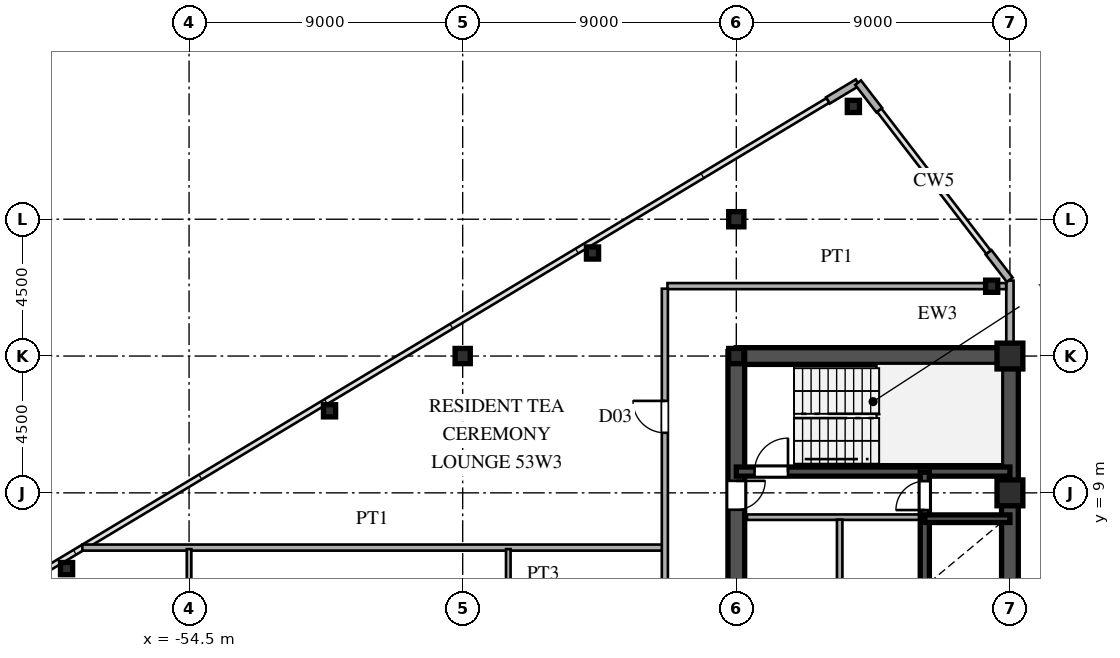
"""IFC4 building model, lengths in metres.
Left out: names, types, materials, properties, quantities, classifications, styles, units other than length and angle.
Written with IfcOpenShell. Run it as: python <this file> out.ifc"""

import sys

from ifc_helpers import new_model, si_unit, direction, frame, frame_2d, origin, origin_2d, place, context, subcontext, project, spatial, rectangle, hollow_rectangle, i_section, extrude, source, transform, mapped, element, fill, save


model = new_model("IFC4")
c1 = context("Model", 3, precision=1e-05, world=origin(), true_north=direction((0.0, 1.0)))
c2 = subcontext(c1, "Body", "Model", "MODEL_VIEW")
j1 = project(units=[si_unit("LENGTHUNIT", "METRE"), si_unit("PLANEANGLEUNIT", "RADIAN")], contexts=[c1])
p1 = place(None, origin())
s1 = spatial("IfcSite", under=j1, at=p1, CompositionType="ELEMENT")
p2 = place(p1, origin())
s2 = spatial("IfcBuilding", under=s1, at=p2, CompositionType="ELEMENT")
p3 = place(p2, frame((0.0, 0.0, 199.5)))
s3 = spatial("IfcBuildingStorey", under=s2, at=p3, CompositionType="ELEMENT", Elevation=199.5)
m1 = source(origin(), c2, "Body", "SweptSolid", [
    extrude(hollow_rectangle(XDim=0.85, YDim=0.85, WallThickness=0.036, at=origin_2d()), origin(), (0.0, 0.0, 1.0), 3.6),
])
for number, where, z_axis, x_axis in (
    (1, (-27.5, 9.0, 0.0), (0.0, 0.0, 1.0), (1.0, 0.0, 0.0)),
    (2, (-27.5, 13.5, 0.0), (0.0, 0.0, 1.0), (1.0, 0.0, 0.0)),
):
    element("IfcColumn", number, at=place(p3, frame(where, z_axis=z_axis, x_axis=x_axis)), inside=s3, PredefinedType="COLUMN", context=c2, shape_type="MappedRepresentation", body=[
        mapped(m1, transform((0.0, 0.0, 0.0), scale=1.0)),
    ])
m2 = source(origin(), c2, "Body", "SweptSolid", [
    extrude(i_section(OverallWidth=0.5, OverallDepth=0.5, WebThickness=0.02, FlangeThickness=0.032, at=origin_2d()), origin(), (0.0, 0.0, 1.0), 3.6),
])
for number, where, z_axis, x_axis in (
    (3, (-36.5, 13.5, 0.0), (0.0, 0.0, 1.0), (1.0, 0.0, 0.0)),
    (4, (-36.5, 18.0, 0.0), (0.0, 0.0, 1.0), (1.0, 0.0, 0.0)),
    (5, (-45.5, 13.5, 0.0), (0.0, 0.0, 1.0), (1.0, 0.0, 0.0)),
):
    element("IfcColumn", number, at=place(p3, frame(where, z_axis=z_axis, x_axis=x_axis)), inside=s3, PredefinedType="COLUMN", context=c2, shape_type="MappedRepresentation", body=[
        mapped(m2, transform((0.0, 0.0, 0.0), scale=1.0)),
    ])
m3 = source(origin(), c2, "Body", "SweptSolid", [
    extrude(hollow_rectangle(XDim=0.4, YDim=0.4, WallThickness=0.016, at=origin_2d()), origin(), (0.0, 0.0, 1.0), 3.6),
])
for number, where, z_axis, x_axis in (
    (6, (-28.1, 15.796, 0.0), (0.0, 0.0, 1.0), (1.0, 0.0, 0.0)),
    (7, (-32.65, 21.71, 0.0), (0.0, 0.0, 1.0), (1.0, 0.0, 0.0)),
    (8, (-41.23, 16.889, 0.0), (0.0, 0.0, 1.0), (1.0, 0.0, 0.0)),
    (9, (-49.88, 11.699, 0.0), (0.0, 0.0, 1.0), (1.0, 0.0, 0.0)),
    (10, (-58.53, 6.509, 0.0), (0.0, 0.0, 1.0), (1.0, 0.0, 0.0)),
):
    element("IfcColumn", number, at=place(p3, frame(where, z_axis=z_axis, x_axis=x_axis)), inside=s3, PredefinedType="COLUMN", context=c2, shape_type="MappedRepresentation", body=[
        mapped(m3, transform((0.0, 0.0, 0.0), scale=1.0)),
    ])
p4 = place(p3, frame((-27.5, 13.78, 0.0), z_axis=(0.0, 0.0, 1.0), x_axis=(0.0, 1.0, 0.0)))
e11 = element("IfcWall", 11, at=p4, inside=s3, PredefinedType="SOLIDWALL", context=c2, shape_type="SweptSolid", body=[
    extrude(rectangle(XDim=0.6, YDim=0.24, at=frame_2d((0.3, 0.0))), origin(), (0.0, 0.0, 1.0), 2.88),
])
p5 = place(p3, frame((-27.5, 14.38, 0.0), z_axis=(0.0, 0.0, 1.0), x_axis=(0.0, 1.0, 0.0)))
e12 = element("IfcWall", 12, at=p5, inside=s3, PredefinedType="SOLIDWALL", context=c2, shape_type="SweptSolid", body=[
    extrude(rectangle(XDim=1.6, YDim=0.24, at=frame_2d((0.8, 0.0))), origin(), (0.0, 0.0, 1.0), 3.38),
])
for number, where, z_axis, x_axis in (
    (13, (-27.506, 16.008, 0.0), (0.0, 0.0, 1.0), (-0.61, 0.793, 0.0)),
    (14, (-31.799, 21.588, 0.0), (0.0, 0.0, 1.0), (-0.61, 0.793, 0.0)),
    (15, (-32.509, 22.495, 0.0), (0.0, 0.0, 1.0), (-0.857, -0.515, 0.0)),
):
    element("IfcWall", number, at=place(p3, frame(where, z_axis=z_axis, x_axis=x_axis)), inside=s3, PredefinedType="SOLIDWALL", context=c2, shape_type="SweptSolid", body=[
        extrude(rectangle(XDim=1.14, YDim=0.24, at=frame_2d((0.57, 0.0))), origin(), (0.0, 0.0, 1.0), 3.38),
    ])
p6 = place(p3, frame((-27.5, 1.3, 0.0), z_axis=(0.0, 0.0, 1.0), x_axis=(0.0, 1.0, 0.0)))
e16 = element("IfcWall", 16, at=p6, inside=s3, PredefinedType="SHEAR", context=c2, shape_type="SweptSolid", body=[
    extrude(rectangle(XDim=12.2, YDim=0.55, at=frame_2d((6.1, 0.0))), origin(), (0.0, 0.0, 1.0), 3.38),
])
p7 = place(p3, frame((-36.5, 13.5, 0.0), z_axis=(0.0, 0.0, 1.0), x_axis=(1.0, 0.0, 0.0)))
e17 = element("IfcWall", 17, at=p7, inside=s3, PredefinedType="SHEAR", context=c2, shape_type="SweptSolid", body=[
    extrude(rectangle(XDim=9.0, YDim=0.55, at=frame_2d((4.5, 0.0))), origin(), (0.0, 0.0, 1.0), 3.38),
])
p8 = place(p3, frame((-36.5, 8.2, 0.0), z_axis=(0.0, 0.0, 1.0), x_axis=(0.0, 1.0, 0.0)))
e18 = element("IfcWall", 18, at=p8, inside=s3, PredefinedType="SHEAR", context=c2, shape_type="SweptSolid", body=[
    extrude(rectangle(XDim=5.45, YDim=0.55, at=frame_2d((2.725, 0.0))), origin(), (0.0, 0.0, 1.0), 3.38),
])
p9 = place(p8, frame((0.245, 0.0, 0.0)))
e19 = element("IfcOpeningElement", 19, at=p9, cuts=e18, PredefinedType="OPENING", context=c2, shape_type="SweptSolid", body=[
    extrude(rectangle(XDim=0.95, YDim=2.15, at=frame_2d((0.475, 1.075))), frame((0.0, 0.285, 0.0), z_axis=(0.0, -1.0, 0.0), x_axis=(1.0, 0.0, 0.0)), (0.0, 0.0, 1.0), 0.57),
])
p10 = place(p3, frame((-36.5, 1.3, 0.0), z_axis=(0.0, 0.0, 1.0), x_axis=(0.0, 1.0, 0.0)))
e20 = element("IfcWall", 20, at=p10, inside=s3, PredefinedType="SHEAR", context=c2, shape_type="SweptSolid", body=[
    extrude(rectangle(XDim=6.9, YDim=0.55, at=frame_2d((3.45, 0.0))), origin(), (0.0, 0.0, 1.0), 3.38),
])
p11 = place(p10, frame((2.975, 0.0, 0.0)))
e21 = element("IfcOpeningElement", 21, at=p11, cuts=e20, PredefinedType="OPENING", context=c2, shape_type="SweptSolid", body=[
    extrude(rectangle(XDim=0.95, YDim=2.15, at=frame_2d((0.475, 1.075))), frame((0.0, 0.285, 0.0), z_axis=(0.0, -1.0, 0.0), x_axis=(1.0, 0.0, 0.0)), (0.0, 0.0, 1.0), 0.57),
])
p12 = place(p3, frame((-36.5, 9.7, 0.0), z_axis=(0.0, 0.0, 1.0), x_axis=(1.0, 0.0, 0.0)))
e22 = element("IfcWall", 22, at=p12, inside=s3, PredefinedType="SHEAR", context=c2, shape_type="SweptSolid", body=[
    extrude(rectangle(XDim=9.0, YDim=0.3, at=frame_2d((4.5, 0.0))), origin(), (0.0, 0.0, 1.0), 3.38),
])
p13 = place(p12, frame((0.6, 0.0, 0.0)))
e23 = element("IfcOpeningElement", 23, at=p13, cuts=e22, PredefinedType="OPENING", context=c2, shape_type="SweptSolid", body=[
    extrude(rectangle(XDim=1.1, YDim=2.2, at=frame_2d((0.55, 1.1))), frame((0.0, 0.16, 0.0), z_axis=(0.0, -1.0, 0.0), x_axis=(1.0, 0.0, 0.0)), (0.0, 0.0, 1.0), 0.32),
])
p14 = place(p3, frame((-30.3, 8.15, 0.0), z_axis=(0.0, 0.0, 1.0), x_axis=(1.0, 0.0, 0.0)))
e24 = element("IfcWall", 24, at=p14, inside=s3, PredefinedType="SHEAR", context=c2, shape_type="SweptSolid", body=[
    extrude(rectangle(XDim=2.8, YDim=0.25, at=frame_2d((1.4, 0.0))), origin(), (0.0, 0.0, 1.0), 3.38),
])
p15 = place(p3, frame((-30.3, 5.9, 0.0), z_axis=(0.0, 0.0, 1.0), x_axis=(0.0, 1.0, 0.0)))
e25 = element("IfcWall", 25, at=p15, inside=s3, PredefinedType="SHEAR", context=c2, shape_type="SweptSolid", body=[
    extrude(rectangle(XDim=2.25, YDim=0.3, at=frame_2d((1.125, 0.0))), origin(), (0.0, 0.0, 1.0), 3.38),
])
p16 = place(p3, frame((-30.3, 8.15, 0.0), z_axis=(0.0, 0.0, 1.0), x_axis=(0.0, 1.0, 0.0)))
e26 = element("IfcWall", 26, at=p16, inside=s3, PredefinedType="SHEAR", context=c2, shape_type="SweptSolid", body=[
    extrude(rectangle(XDim=1.53, YDim=0.3, at=frame_2d((0.765, 0.0))), origin(), (0.0, 0.0, 1.0), 3.38),
])
p17 = place(p16, frame((0.285, 0.0, 0.0)))
e27 = element("IfcOpeningElement", 27, at=p17, cuts=e26, PredefinedType="OPENING", context=c2, shape_type="SweptSolid", body=[
    extrude(rectangle(XDim=0.95, YDim=2.15, at=frame_2d((0.475, 1.075))), frame((0.0, 0.16, 0.0), z_axis=(0.0, -1.0, 0.0), x_axis=(1.0, 0.0, 0.0)), (0.0, 0.0, 1.0), 0.32),
])
p18 = place(p3, frame((-36.15, 8.2, 0.0), z_axis=(0.0, 0.0, 1.0), x_axis=(1.0, 0.0, 0.0)))
e28 = element("IfcWall", 28, at=p18, inside=s3, PredefinedType="PARTITIONING", context=c2, shape_type="SweptSolid", body=[
    extrude(rectangle(XDim=5.7, YDim=0.18, at=frame_2d((2.85, 0.0))), origin(), (0.0, 0.0, 1.0), 3.38),
])
p19 = place(p3, frame((-33.1, 1.38, 0.0), z_axis=(0.0, 0.0, 1.0), x_axis=(0.0, 1.0, 0.0)))
e29 = element("IfcWall", 29, at=p19, inside=s3, PredefinedType="PARTITIONING", context=c2, shape_type="SweptSolid", body=[
    extrude(rectangle(XDim=6.74, YDim=0.18, at=frame_2d((3.37, 0.0))), origin(), (0.0, 0.0, 1.0), 3.38),
])
p20 = place(p3, frame((-58.01, 7.2, 0.0), z_axis=(0.0, 0.0, 1.0), x_axis=(1.0, 0.0, 0.0)))
e30 = element("IfcWall", 30, at=p20, inside=s3, PredefinedType="PARTITIONING", context=c2, shape_type="SweptSolid", body=[
    extrude(rectangle(XDim=19.08, YDim=0.2, at=frame_2d((9.54, 0.0))), origin(), (0.0, 0.0, 1.0), 3.38),
])
p21 = place(p3, frame((-38.765, 15.8, 0.0), z_axis=(0.0, 0.0, 1.0), x_axis=(1.0, 0.0, 0.0)))
e31 = element("IfcWall", 31, at=p21, inside=s3, PredefinedType="PARTITIONING", context=c2, shape_type="SweptSolid", body=[
    extrude(rectangle(XDim=11.14, YDim=0.2, at=frame_2d((5.57, 0.0))), origin(), (0.0, 0.0, 1.0), 3.38),
])
p22 = place(p3, frame((-54.5, -6.15, 0.0), z_axis=(0.0, 0.0, 1.0), x_axis=(0.0, 1.0, 0.0)))
e32 = element("IfcWall", 32, at=p22, inside=s3, PredefinedType="PARTITIONING", context=c2, shape_type="SweptSolid", body=[
    extrude(rectangle(XDim=13.3, YDim=0.15, at=frame_2d((6.65, 0.0))), origin(), (0.0, 0.0, 1.0), 2.78),
])
p23 = place(p22, frame((6.175, 0.0, 0.0)))
e33 = element("IfcOpeningElement", 33, at=p23, cuts=e32, PredefinedType="OPENING", context=c2, shape_type="SweptSolid", body=[
    extrude(rectangle(XDim=0.95, YDim=2.15, at=frame_2d((0.475, 1.075))), frame((0.0, 0.085, 0.0), z_axis=(0.0, -1.0, 0.0), x_axis=(1.0, 0.0, 0.0)), (0.0, 0.0, 1.0), 0.17),
])
p24 = place(p3, frame((-44.0, 3.232, 0.0), z_axis=(0.0, 0.0, 1.0), x_axis=(0.0, 1.0, 0.0)))
e34 = element("IfcWall", 34, at=p24, inside=s3, PredefinedType="PARTITIONING", context=c2, shape_type="SweptSolid", body=[
    extrude(rectangle(XDim=3.918, YDim=0.15, at=frame_2d((1.959, 0.0))), origin(), (0.0, 0.0, 1.0), 3.38),
])
p25 = place(p3, frame((-38.85, -15.715, 0.0), z_axis=(0.0, 0.0, 1.0), x_axis=(0.0, 1.0, 0.0)))
e35 = element("IfcWall", 35, at=p25, inside=s3, PredefinedType="PARTITIONING", context=c2, shape_type="SweptSolid", body=[
    extrude(rectangle(XDim=31.43, YDim=0.2, at=frame_2d((15.715, 0.0))), origin(), (0.0, 0.0, 1.0), 3.38),
])
p26 = place(p25, frame((7.593, 0.0, 0.0)))
e36 = element("IfcOpeningElement", 36, at=p26, cuts=e35, PredefinedType="OPENING", context=c2, shape_type="SweptSolid", body=[
    extrude(rectangle(XDim=1.05, YDim=2.25, at=frame_2d((0.525, 1.125))), frame((0.0, 0.11, 0.0), z_axis=(0.0, -1.0, 0.0), x_axis=(1.0, 0.0, 0.0)), (0.0, 0.0, 1.0), 0.22),
])
p27 = place(p25, frame((15.489, 0.0, 0.0)))
e37 = element("IfcOpeningElement", 37, at=p27, cuts=e35, PredefinedType="OPENING", context=c2, shape_type="SweptSolid", body=[
    extrude(rectangle(XDim=1.05, YDim=2.25, at=frame_2d((0.525, 1.125))), frame((0.0, 0.11, 0.0), z_axis=(0.0, -1.0, 0.0), x_axis=(1.0, 0.0, 0.0)), (0.0, 0.0, 1.0), 0.22),
])
p28 = place(p25, frame((26.69, 0.0, 0.0)))
e38 = element("IfcOpeningElement", 38, at=p28, cuts=e35, PredefinedType="OPENING", context=c2, shape_type="SweptSolid", body=[
    extrude(rectangle(XDim=1.05, YDim=2.25, at=frame_2d((0.525, 1.125))), frame((0.0, 0.11, 0.0), z_axis=(0.0, -1.0, 0.0), x_axis=(1.0, 0.0, 0.0)), (0.0, 0.0, 1.0), 0.22),
])
m4 = source(origin(), c2, "Body", "SweptSolid", [
    extrude(rectangle(XDim=0.95, YDim=2.15, at=frame_2d((0.475, 1.075))), frame((0.0, 0.025, 0.0), z_axis=(0.0, -1.0, 0.0), x_axis=(1.0, 0.0, 0.0)), (0.0, 0.0, 1.0), 0.05),
])
p29 = place(p9, frame((0.95, 0.0, 0.0), z_axis=(0.0, 0.0, 1.0), x_axis=(-1.0, 0.0, 0.0)))
e39 = element("IfcDoor", 39, at=p29, inside=s3, OperationType="SINGLE_SWING_RIGHT", PredefinedType="DOOR", context=c2, shape_type="MappedRepresentation", body=[
    mapped(m4, transform((0.0, 0.0, 0.0), scale=1.0)),
])
fill(e19, e39)
m5 = source(origin(), c2, "Body", "SweptSolid", [
    extrude(rectangle(XDim=1.1, YDim=2.2, at=frame_2d((0.55, 1.1))), frame((0.0, 0.025, 0.0), z_axis=(0.0, -1.0, 0.0), x_axis=(1.0, 0.0, 0.0)), (0.0, 0.0, 1.0), 0.05),
])
p30 = place(p13, origin())
e40 = element("IfcDoor", 40, at=p30, inside=s3, OperationType="SINGLE_SWING_RIGHT", PredefinedType="DOOR", context=c2, shape_type="MappedRepresentation", body=[
    mapped(m5, transform((0.0, 0.0, 0.0), scale=1.0)),
])
fill(e23, e40)
p31 = place(p17, origin())
e41 = element("IfcDoor", 41, at=p31, inside=s3, OperationType="SINGLE_SWING_LEFT", PredefinedType="DOOR", context=c2, shape_type="MappedRepresentation", body=[
    mapped(m4, transform((0.0, 0.0, 0.0), scale=1.0)),
])
fill(e27, e41)
m6 = source(origin(), c2, "Body", "SweptSolid", [
    extrude(rectangle(XDim=1.05, YDim=2.25, at=frame_2d((0.525, 1.125))), frame((0.0, 0.025, 0.0), z_axis=(0.0, -1.0, 0.0), x_axis=(1.0, 0.0, 0.0)), (0.0, 0.0, 1.0), 0.05),
])
p32 = place(p28, origin())
e42 = element("IfcDoor", 42, at=p32, inside=s3, OperationType="SINGLE_SWING_RIGHT", PredefinedType="DOOR", context=c2, shape_type="MappedRepresentation", body=[
    mapped(m6, transform((0.0, 0.0, 0.0), scale=1.0)),
])
fill(e38, e42)
save(model, sys.argv[1])
